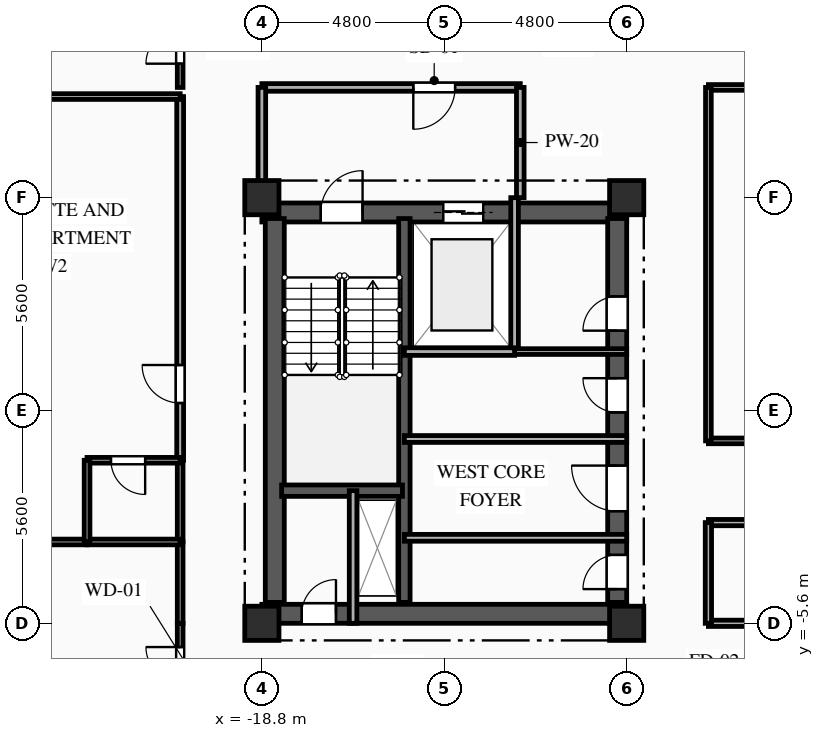
"""IFC4 building model, lengths in metres.
Left out: names, types, materials, properties, quantities, classifications, styles, units other than length and angle.
Written with IfcOpenShell. Run it as: python <this file> out.ifc"""

import sys

from ifc_helpers import new_model, si_unit, direction, frame, frame_2d, origin, origin_2d, place, context, subcontext, project, spatial, rectangle, extrude, element, fill, save


model = new_model("IFC4")
c1 = context("Model", 3, precision=1e-05, world=origin(), true_north=direction((0.0, 1.0)))
c2 = subcontext(c1, "Body", "Model", "MODEL_VIEW")
j1 = project(units=[si_unit("LENGTHUNIT", "METRE"), si_unit("PLANEANGLEUNIT", "RADIAN")], contexts=[c1])
p1 = place(None, origin())
s1 = spatial("IfcSite", under=j1, at=p1, CompositionType="ELEMENT")
p2 = place(p1, origin())
s2 = spatial("IfcBuilding", under=s1, at=p2, CompositionType="ELEMENT")
p3 = place(p2, frame((0.0, 0.0, 161.15)))
s3 = spatial("IfcBuildingStorey", under=s2, at=p3, CompositionType="ELEMENT", Elevation=161.15)
for number, where, z_axis, x_axis in (
    (1, (-18.8, -5.6, 0.0), (0.0, 0.0, 1.0), (1.0, 0.0, 0.0)),
    (2, (-18.8, 5.6, 0.0), (0.0, 0.0, 1.0), (1.0, 0.0, 0.0)),
    (3, (-9.2, -5.6, 0.0), (0.0, 0.0, 1.0), (1.0, 0.0, 0.0)),
    (4, (-9.2, 5.6, 0.0), (0.0, 0.0, 1.0), (1.0, 0.0, 0.0)),
):
    element("IfcColumn", number, at=place(p3, frame(where, z_axis=z_axis, x_axis=x_axis)), inside=s3, PredefinedType="COLUMN", context=c2, shape_type="SweptSolid", body=[
        extrude(rectangle(XDim=0.9, YDim=0.9, at=origin_2d()), origin(), (0.0, 0.0, 1.0), 3.35),
    ])
p4 = place(p3, frame((-18.8, 5.21, 0.0), z_axis=(0.0, 0.0, 1.0), x_axis=(1.0, 0.0, 0.0)))
e5 = element("IfcWall", 5, at=p4, inside=s3, PredefinedType="SHEAR", context=c2, shape_type="SweptSolid", body=[
    extrude(rectangle(XDim=9.6, YDim=0.5, at=frame_2d((4.8, 0.0))), origin(), (0.0, 0.0, 1.0), 3.04),
])
p5 = place(p4, frame((1.55, 0.0, 0.0)))
e6 = element("IfcOpeningElement", 6, at=p5, cuts=e5, PredefinedType="OPENING", context=c2, shape_type="SweptSolid", body=[
    extrude(rectangle(XDim=1.1, YDim=2.15, at=frame_2d((0.55, 1.075))), frame((0.0, 0.26, 0.0), z_axis=(0.0, -1.0, 0.0), x_axis=(1.0, 0.0, 0.0)), (0.0, 0.0, 1.0), 0.52),
])
p6 = place(p4, frame((4.775, 0.0, 0.0)))
e7 = element("IfcOpeningElement", 7, at=p6, cuts=e5, PredefinedType="OPENING", context=c2, shape_type="SweptSolid", body=[
    extrude(rectangle(XDim=1.05, YDim=2.1, at=frame_2d((0.525, 1.05))), frame((0.0, 0.26, 0.0), z_axis=(0.0, -1.0, 0.0), x_axis=(1.0, 0.0, 0.0)), (0.0, 0.0, 1.0), 0.52),
])
p7 = place(p3, frame((-18.8, -5.35, 0.0), z_axis=(0.0, 0.0, 1.0), x_axis=(1.0, 0.0, 0.0)))
e8 = element("IfcWall", 8, at=p7, inside=s3, PredefinedType="SHEAR", context=c2, shape_type="SweptSolid", body=[
    extrude(rectangle(XDim=9.6, YDim=0.5, at=frame_2d((4.8, 0.0))), origin(), (0.0, 0.0, 1.0), 3.04),
])
p8 = place(p7, frame((1.05, 0.0, 0.0)))
e9 = element("IfcOpeningElement", 9, at=p8, cuts=e8, PredefinedType="OPENING", context=c2, shape_type="SweptSolid", body=[
    extrude(rectangle(XDim=0.9, YDim=2.1, at=frame_2d((0.45, 1.05))), frame((0.0, 0.26, 0.0), z_axis=(0.0, -1.0, 0.0), x_axis=(1.0, 0.0, 0.0)), (0.0, 0.0, 1.0), 0.52),
])
p9 = place(p3, frame((-18.46, -5.05, 0.0), z_axis=(0.0, 0.0, 1.0), x_axis=(0.0, 1.0, 0.0)))
e10 = element("IfcWall", 10, at=p9, inside=s3, PredefinedType="SHEAR", context=c2, shape_type="SweptSolid", body=[
    extrude(rectangle(XDim=10.1, YDim=0.5, at=frame_2d((5.05, 0.0))), origin(), (0.0, 0.0, 1.0), 3.04),
])
p10 = place(p3, frame((-9.45, -5.05, 0.0), z_axis=(0.0, 0.0, 1.0), x_axis=(0.0, 1.0, 0.0)))
e11 = element("IfcWall", 11, at=p10, inside=s3, PredefinedType="SHEAR", context=c2, shape_type="SweptSolid", body=[
    extrude(rectangle(XDim=10.1, YDim=0.5, at=frame_2d((5.05, 0.0))), origin(), (0.0, 0.0, 1.0), 3.04),
])
p11 = place(p10, frame((7.15, 0.0, 0.0)))
e12 = element("IfcOpeningElement", 12, at=p11, cuts=e11, PredefinedType="OPENING", context=c2, shape_type="SweptSolid", body=[
    extrude(rectangle(XDim=0.9, YDim=2.1, at=frame_2d((0.45, 1.05))), frame((0.0, 0.26, 0.0), z_axis=(0.0, -1.0, 0.0), x_axis=(1.0, 0.0, 0.0)), (0.0, 0.0, 1.0), 0.52),
])
p12 = place(p10, frame((2.4, 0.0, 0.0)))
e13 = element("IfcOpeningElement", 13, at=p12, cuts=e11, PredefinedType="OPENING", context=c2, shape_type="SweptSolid", body=[
    extrude(rectangle(XDim=1.2, YDim=2.15, at=frame_2d((0.6, 1.075))), frame((0.0, 0.26, 0.0), z_axis=(0.0, -1.0, 0.0), x_axis=(1.0, 0.0, 0.0)), (0.0, 0.0, 1.0), 0.52),
])
p13 = place(p10, frame((0.35, 0.0, 0.0)))
e14 = element("IfcOpeningElement", 14, at=p13, cuts=e11, PredefinedType="OPENING", context=c2, shape_type="SweptSolid", body=[
    extrude(rectangle(XDim=0.9, YDim=2.1, at=frame_2d((0.45, 1.05))), frame((0.0, 0.26, 0.0), z_axis=(0.0, -1.0, 0.0), x_axis=(1.0, 0.0, 0.0)), (0.0, 0.0, 1.0), 0.52),
])
p14 = place(p10, frame((5.0, 0.0, 0.0)))
e15 = element("IfcOpeningElement", 15, at=p14, cuts=e11, PredefinedType="OPENING", context=c2, shape_type="SweptSolid", body=[
    extrude(rectangle(XDim=0.9, YDim=2.1, at=frame_2d((0.45, 1.05))), frame((0.0, 0.26, 0.0), z_axis=(0.0, -1.0, 0.0), x_axis=(1.0, 0.0, 0.0)), (0.0, 0.0, 1.0), 0.52),
])
p15 = place(p3, frame((-15.05, -5.05, 0.0), z_axis=(0.0, 0.0, 1.0), x_axis=(0.0, 1.0, 0.0)))
e16 = element("IfcWall", 16, at=p15, inside=s3, PredefinedType="SHEAR", context=c2, shape_type="SweptSolid", body=[
    extrude(rectangle(XDim=10.1, YDim=0.3, at=frame_2d((5.05, 0.0))), origin(), (0.0, 0.0, 1.0), 3.04),
])
p16 = place(p3, frame((-18.28, -2.11, 0.0), z_axis=(0.0, 0.0, 1.0), x_axis=(1.0, 0.0, 0.0)))
e17 = element("IfcWall", 17, at=p16, inside=s3, PredefinedType="SHEAR", context=c2, shape_type="SweptSolid", body=[
    extrude(rectangle(XDim=3.18, YDim=0.3, at=frame_2d((1.59, 0.0))), origin(), (0.0, 0.0, 1.0), 3.04),
])
p17 = place(p3, frame((-16.4, -5.6, 0.0), z_axis=(0.0, 0.0, 1.0), x_axis=(0.0, 1.0, 0.0)))
e18 = element("IfcWall", 18, at=p17, inside=s3, PredefinedType="PARTITIONING", context=c2, shape_type="SweptSolid", body=[
    extrude(rectangle(XDim=3.49, YDim=0.2, at=frame_2d((1.745, 0.0))), origin(), (0.0, 0.0, 1.0), 3.04),
])
p18 = place(p3, frame((-12.15, 1.55, 0.0), z_axis=(0.0, 0.0, 1.0), x_axis=(0.0, 1.0, 0.0)))
e19 = element("IfcWall", 19, at=p18, inside=s3, PredefinedType="PARTITIONING", context=c2, shape_type="SweptSolid", body=[
    extrude(rectangle(XDim=4.05, YDim=0.2, at=frame_2d((2.025, 0.0))), origin(), (0.0, 0.0, 1.0), 3.04),
])
p19 = place(p3, frame((-12.0, 8.5, 0.0), z_axis=(0.0, 0.0, 1.0), x_axis=(-1.0, 0.0, 0.0)))
e20 = element("IfcWall", 20, at=p19, inside=s3, PredefinedType="PARTITIONING", context=c2, shape_type="SweptSolid", body=[
    extrude(rectangle(XDim=6.8, YDim=0.2, at=frame_2d((3.4, 0.0))), origin(), (0.0, 0.0, 1.0), 3.04),
])
p20 = place(p19, frame((1.715, 0.0, 0.0)))
e21 = element("IfcOpeningElement", 21, at=p20, cuts=e20, PredefinedType="OPENING", context=c2, shape_type="SweptSolid", body=[
    extrude(rectangle(XDim=1.1, YDim=2.15, at=frame_2d((0.55, 1.075))), frame((0.0, 0.11, 0.0), z_axis=(0.0, -1.0, 0.0), x_axis=(1.0, 0.0, 0.0)), (0.0, 0.0, 1.0), 0.22),
])
p21 = place(p3, frame((-18.8, 8.5, 0.0), z_axis=(0.0, 0.0, 1.0), x_axis=(0.0, -1.0, 0.0)))
e22 = element("IfcWall", 22, at=p21, inside=s3, PredefinedType="PARTITIONING", context=c2, shape_type="SweptSolid", body=[
    extrude(rectangle(XDim=2.9, YDim=0.2, at=frame_2d((1.45, 0.0))), origin(), (0.0, 0.0, 1.0), 2.525),
])
p22 = place(p3, frame((-12.0, 5.6, 0.0), z_axis=(0.0, 0.0, 1.0), x_axis=(0.0, 1.0, 0.0)))
e23 = element("IfcWall", 23, at=p22, inside=s3, PredefinedType="PARTITIONING", context=c2, shape_type="SweptSolid", body=[
    extrude(rectangle(XDim=2.9, YDim=0.2, at=frame_2d((1.45, 0.0))), origin(), (0.0, 0.0, 1.0), 3.04),
])
p23 = place(p3, frame((-12.15, 1.55, 0.0), z_axis=(0.0, 0.0, 1.0), x_axis=(1.0, 0.0, 0.0)))
e24 = element("IfcWall", 24, at=p23, inside=s3, PredefinedType="PARTITIONING", context=c2, shape_type="SweptSolid", body=[
    extrude(rectangle(XDim=2.95, YDim=0.15, at=frame_2d((1.475, 0.0))), origin(), (0.0, 0.0, 1.0), 3.04),
])
p24 = place(p3, frame((-15.05, -3.35, 0.0), z_axis=(0.0, 0.0, 1.0), x_axis=(1.0, 0.0, 0.0)))
e25 = element("IfcWall", 25, at=p24, inside=s3, PredefinedType="PARTITIONING", context=c2, shape_type="SweptSolid", body=[
    extrude(rectangle(XDim=5.85, YDim=0.18, at=frame_2d((2.925, 0.0))), origin(), (0.0, 0.0, 1.0), 2.755),
])
p25 = place(p3, frame((-9.2, -0.75, 0.0), z_axis=(0.0, 0.0, 1.0), x_axis=(-1.0, 0.0, 0.0)))
e26 = element("IfcWall", 26, at=p25, inside=s3, PredefinedType="PARTITIONING", context=c2, shape_type="SweptSolid", body=[
    extrude(rectangle(XDim=5.85, YDim=0.18, at=frame_2d((2.925, 0.0))), origin(), (0.0, 0.0, 1.0), 3.04),
])
p26 = place(p3, frame((-20.95, 8.5, 0.0), z_axis=(0.0, 0.0, 1.0), x_axis=(0.0, 1.0, 0.0)))
e27 = element("IfcWall", 27, at=p26, inside=s3, PredefinedType="PARTITIONING", context=c2, shape_type="SweptSolid", body=[
    extrude(rectangle(XDim=2.15, YDim=0.15, at=frame_2d((1.075, 0.0))), origin(), (0.0, 0.0, 1.0), 3.04),
])
p27 = place(p26, frame((0.625, 0.0, 0.0)))
e28 = element("IfcOpeningElement", 28, at=p27, cuts=e27, PredefinedType="OPENING", context=c2, shape_type="SweptSolid", body=[
    extrude(rectangle(XDim=0.9, YDim=2.1, at=frame_2d((0.45, 1.05))), frame((0.0, 0.085, 0.0), z_axis=(0.0, -1.0, 0.0), x_axis=(1.0, 0.0, 0.0)), (0.0, 0.0, 1.0), 0.17),
])
p28 = place(p3, frame((0.0, 8.5, 0.0), z_axis=(0.0, 0.0, 1.0), x_axis=(-1.0, 0.0, 0.0)))
e29 = element("IfcWall", 29, at=p28, inside=s3, PredefinedType="PARTITIONING", context=c2, shape_type="SweptSolid", body=[
    extrude(rectangle(XDim=7.05, YDim=0.15, at=frame_2d((3.525, 0.0))), origin(), (0.0, 0.0, 1.0), 3.04),
])
p29 = place(p3, frame((-20.95, -7.75, 0.0), z_axis=(0.0, 0.0, 1.0), x_axis=(0.0, 1.0, 0.0)))
e30 = element("IfcWall", 30, at=p29, inside=s3, PredefinedType="PARTITIONING", context=c2, shape_type="SweptSolid", body=[
    extrude(rectangle(XDim=2.15, YDim=0.15, at=frame_2d((1.075, 0.0))), origin(), (0.0, 0.0, 1.0), 3.04),
])
p30 = place(p29, frame((0.625, 0.0, 0.0)))
e31 = element("IfcOpeningElement", 31, at=p30, cuts=e30, PredefinedType="OPENING", context=c2, shape_type="SweptSolid", body=[
    extrude(rectangle(XDim=0.9, YDim=2.1, at=frame_2d((0.45, 1.05))), frame((0.0, 0.085, 0.0), z_axis=(0.0, -1.0, 0.0), x_axis=(1.0, 0.0, 0.0)), (0.0, 0.0, 1.0), 0.17),
])
p31 = place(p3, frame((-7.05, -5.6, 0.0), z_axis=(0.0, 0.0, 1.0), x_axis=(1.0, 0.0, 0.0)))
e32 = element("IfcWall", 32, at=p31, inside=s3, PredefinedType="PARTITIONING", context=c2, shape_type="SweptSolid", body=[
    extrude(rectangle(XDim=7.05, YDim=0.165, at=frame_2d((3.525, 0.0))), origin(), (0.0, 0.0, 1.0), 2.525),
])
p32 = place(p3, frame((-20.95, -5.6, 0.0), z_axis=(0.0, 0.0, 1.0), x_axis=(0.0, 1.0, 0.0)))
e33 = element("IfcWall", 33, at=p32, inside=s3, PredefinedType="PARTITIONING", context=c2, shape_type="SweptSolid", body=[
    extrude(rectangle(XDim=2.14, YDim=0.15, at=frame_2d((1.07, 0.0))), origin(), (0.0, 0.0, 1.0), 3.04),
])
p33 = place(p3, frame((-20.95, -1.31, 0.0), z_axis=(0.0, 0.0, 1.0), x_axis=(0.0, 1.0, 0.0)))
e34 = element("IfcWall", 34, at=p33, inside=s3, PredefinedType="PARTITIONING", context=c2, shape_type="SweptSolid", body=[
    extrude(rectangle(XDim=9.57, YDim=0.18, at=frame_2d((4.785, 0.0))), origin(), (0.0, 0.0, 1.0), 3.04),
])
p34 = place(p33, frame((1.506, 0.0, 0.0)))
e35 = element("IfcOpeningElement", 35, at=p34, cuts=e34, PredefinedType="OPENING", context=c2, shape_type="SweptSolid", body=[
    extrude(rectangle(XDim=1.0, YDim=2.15, at=frame_2d((0.5, 1.075))), frame((0.0, 0.1, 0.0), z_axis=(0.0, -1.0, 0.0), x_axis=(1.0, 0.0, 0.0)), (0.0, 0.0, 1.0), 0.2),
])
p35 = place(p3, frame((-20.95, -3.46, 0.0), z_axis=(0.0, 0.0, 1.0), x_axis=(0.0, 1.0, 0.0)))
e36 = element("IfcWall", 36, at=p35, inside=s3, PredefinedType="PLUMBINGWALL", context=c2, shape_type="SweptSolid", body=[
    extrude(rectangle(XDim=2.15, YDim=0.15, at=frame_2d((1.075, 0.0))), origin(), (0.0, 0.0, 1.0), 3.04),
])
p36 = place(p3, frame((-7.05, -0.8, 0.0), z_axis=(0.0, 0.0, 1.0), x_axis=(1.0, 0.0, 0.0)))
e37 = element("IfcWall", 37, at=p36, inside=s3, PredefinedType="PARTITIONING", context=c2, shape_type="SweptSolid", body=[
    extrude(rectangle(XDim=14.1, YDim=0.15, at=frame_2d((7.05, 0.0))), origin(), (0.0, 0.0, 1.0), 3.04),
])
p37 = place(p36, frame((6.525, 0.0, 0.0)))
e38 = element("IfcOpeningElement", 38, at=p37, cuts=e37, PredefinedType="OPENING", context=c2, shape_type="SweptSolid", body=[
    extrude(rectangle(XDim=1.05, YDim=2.15, at=frame_2d((0.525, 1.075))), frame((0.0, 0.085, 0.0), z_axis=(0.0, -1.0, 0.0), x_axis=(1.0, 0.0, 0.0)), (0.0, 0.0, 1.0), 0.17),
])
p38 = place(p3, frame((7.05, -2.95, 0.0), z_axis=(0.0, 0.0, 1.0), x_axis=(-1.0, 0.0, 0.0)))
e39 = element("IfcWall", 39, at=p38, inside=s3, PredefinedType="PARTITIONING", context=c2, shape_type="SweptSolid", body=[
    extrude(rectangle(XDim=14.1, YDim=0.165, at=frame_2d((7.05, 0.0))), origin(), (0.0, 0.0, 1.0), 3.04),
])
p39 = place(p38, frame((6.475, 0.0, 0.0)))
e40 = element("IfcOpeningElement", 40, at=p39, cuts=e39, PredefinedType="OPENING", context=c2, shape_type="SweptSolid", body=[
    extrude(rectangle(XDim=1.15, YDim=2.15, at=frame_2d((0.575, 1.075))), frame((0.0, 0.093, 0.0), z_axis=(0.0, -1.0, 0.0), x_axis=(1.0, 0.0, 0.0)), (0.0, 0.0, 1.0), 0.185),
])
p40 = place(p3, frame((-7.05, 8.5, 0.0), z_axis=(0.0, 0.0, 1.0), x_axis=(0.0, -1.0, 0.0)))
e41 = element("IfcWall", 41, at=p40, inside=s3, PredefinedType="PARTITIONING", context=c2, shape_type="SweptSolid", body=[
    extrude(rectangle(XDim=9.3, YDim=0.15, at=frame_2d((4.65, 0.0))), origin(), (0.0, 0.0, 1.0), 3.04),
])
p41 = place(p3, frame((-7.05, -2.95, 0.0), z_axis=(0.0, 0.0, 1.0), x_axis=(0.0, -1.0, 0.0)))
e42 = element("IfcWall", 42, at=p41, inside=s3, PredefinedType="PARTITIONING", context=c2, shape_type="SweptSolid", body=[
    extrude(rectangle(XDim=2.65, YDim=0.165, at=frame_2d((1.325, 0.0))), origin(), (0.0, 0.0, 1.0), 3.04),
])
p42 = place(p3, frame((-24.765, -3.46, 0.0), z_axis=(0.0, 0.0, 1.0), x_axis=(1.0, 0.0, 0.0)))
e43 = element("IfcWall", 43, at=p42, inside=s3, PredefinedType="PARTITIONING", context=c2, shape_type="SweptSolid", body=[
    extrude(rectangle(XDim=1.365, YDim=0.15, at=frame_2d((0.683, 0.0))), origin(), (0.0, 0.0, 1.0), 3.04),
])
p43 = place(p3, frame((-23.4, -3.46, 0.0), z_axis=(0.0, 0.0, 1.0), x_axis=(1.0, 0.0, 0.0)))
e44 = element("IfcWall", 44, at=p43, inside=s3, PredefinedType="PLUMBINGWALL", context=c2, shape_type="SweptSolid", body=[
    extrude(rectangle(XDim=2.45, YDim=0.15, at=frame_2d((1.225, 0.0))), origin(), (0.0, 0.0, 1.0), 3.04),
])
p44 = place(p3, frame((-20.95, -1.31, 0.0), z_axis=(0.0, 0.0, 1.0), x_axis=(-1.0, 0.0, 0.0)))
e45 = element("IfcWall", 45, at=p44, inside=s3, PredefinedType="PLUMBINGWALL", context=c2, shape_type="SweptSolid", body=[
    extrude(rectangle(XDim=2.45, YDim=0.15, at=frame_2d((1.225, 0.0))), origin(), (0.0, 0.0, 1.0), 3.04),
])
p45 = place(p44, frame((0.921, 0.0, 0.0)))
e46 = element("IfcOpeningElement", 46, at=p45, cuts=e45, PredefinedType="OPENING", context=c2, shape_type="SweptSolid", body=[
    extrude(rectangle(XDim=0.9, YDim=2.1, at=frame_2d((0.45, 1.05))), frame((0.0, 0.085, 0.0), z_axis=(0.0, -1.0, 0.0), x_axis=(1.0, 0.0, 0.0)), (0.0, 0.0, 1.0), 0.17),
])
p46 = place(p3, frame((-23.4, -1.31, 0.0), z_axis=(0.0, 0.0, 1.0), x_axis=(0.0, -1.0, 0.0)))
e47 = element("IfcWall", 47, at=p46, inside=s3, PredefinedType="PLUMBINGWALL", context=c2, shape_type="SweptSolid", body=[
    extrude(rectangle(XDim=2.15, YDim=0.15, at=frame_2d((1.075, 0.0))), origin(), (0.0, 0.0, 1.0), 3.04),
])
p47 = place(p3, frame((-24.765, 8.26, 0.0), z_axis=(0.0, 0.0, 1.0), x_axis=(1.0, 0.0, 0.0)))
e48 = element("IfcWall", 48, at=p47, inside=s3, PredefinedType="PARTITIONING", context=c2, shape_type="SweptSolid", body=[
    extrude(rectangle(XDim=3.815, YDim=0.15, at=frame_2d((1.907, 0.0))), origin(), (0.0, 0.0, 1.0), 3.04),
])
p48 = place(p3, frame((-15.05, 1.55, 0.0), z_axis=(0.0, 0.0, 1.0), x_axis=(1.0, 0.0, 0.0)))
e49 = element("IfcWall", 49, at=p48, inside=s3, PredefinedType="PARTITIONING", context=c2, shape_type="SweptSolid", body=[
    extrude(rectangle(XDim=2.9, YDim=0.2, at=frame_2d((1.45, 0.0))), origin(), (0.0, 0.0, 1.0), 3.04),
])
p49 = place(p5, origin())
e50 = element("IfcDoor", 50, at=p49, inside=s3, OperationType="SINGLE_SWING_RIGHT", PredefinedType="DOOR", context=c2, shape_type="SweptSolid", body=[
    extrude(rectangle(XDim=1.1, YDim=2.15, at=frame_2d((0.55, 1.075))), frame((0.0, 0.025, 0.0), z_axis=(0.0, -1.0, 0.0), x_axis=(1.0, 0.0, 0.0)), (0.0, 0.0, 1.0), 0.05),
])
fill(e6, e50)
p50 = place(p6, origin())
e51 = element("IfcDoor", 51, at=p50, inside=s3, OperationType="DOUBLE_DOOR_SLIDING", PredefinedType="DOOR", context=c2, shape_type="SweptSolid", body=[
    extrude(rectangle(XDim=1.05, YDim=2.1, at=frame_2d((0.525, 1.05))), frame((0.0, 0.025, 0.0), z_axis=(0.0, -1.0, 0.0), x_axis=(1.0, 0.0, 0.0)), (0.0, 0.0, 1.0), 0.05),
])
fill(e7, e51)
p51 = place(p8, origin())
e52 = element("IfcDoor", 52, at=p51, inside=s3, OperationType="SINGLE_SWING_RIGHT", PredefinedType="DOOR", context=c2, shape_type="SweptSolid", body=[
    extrude(rectangle(XDim=0.9, YDim=2.1, at=frame_2d((0.45, 1.05))), frame((0.0, 0.025, 0.0), z_axis=(0.0, -1.0, 0.0), x_axis=(1.0, 0.0, 0.0)), (0.0, 0.0, 1.0), 0.05),
])
fill(e9, e52)
p52 = place(p20, origin())
e53 = element("IfcDoor", 53, at=p52, inside=s3, OperationType="SINGLE_SWING_RIGHT", PredefinedType="DOOR", context=c2, shape_type="SweptSolid", body=[
    extrude(rectangle(XDim=1.1, YDim=2.15, at=frame_2d((0.55, 1.075))), frame((0.0, 0.025, 0.0), z_axis=(0.0, -1.0, 0.0), x_axis=(1.0, 0.0, 0.0)), (0.0, 0.0, 1.0), 0.05),
])
fill(e21, e53)
p53 = place(p11, origin())
e54 = element("IfcDoor", 54, at=p53, inside=s3, OperationType="SINGLE_SWING_LEFT", PredefinedType="DOOR", context=c2, shape_type="SweptSolid", body=[
    extrude(rectangle(XDim=0.9, YDim=2.1, at=frame_2d((0.45, 1.05))), frame((0.0, 0.025, 0.0), z_axis=(0.0, -1.0, 0.0), x_axis=(1.0, 0.0, 0.0)), (0.0, 0.0, 1.0), 0.05),
])
fill(e12, e54)
p54 = place(p12, origin())
e55 = element("IfcDoor", 55, at=p54, inside=s3, OperationType="SINGLE_SWING_RIGHT", PredefinedType="DOOR", context=c2, shape_type="SweptSolid", body=[
    extrude(rectangle(XDim=1.2, YDim=2.15, at=frame_2d((0.6, 1.075))), frame((0.0, 0.025, 0.0), z_axis=(0.0, -1.0, 0.0), x_axis=(1.0, 0.0, 0.0)), (0.0, 0.0, 1.0), 0.05),
])
fill(e13, e55)
p55 = place(p13, origin())
e56 = element("IfcDoor", 56, at=p55, inside=s3, OperationType="SINGLE_SWING_LEFT", PredefinedType="DOOR", context=c2, shape_type="SweptSolid", body=[
    extrude(rectangle(XDim=0.9, YDim=2.1, at=frame_2d((0.45, 1.05))), frame((0.0, 0.025, 0.0), z_axis=(0.0, -1.0, 0.0), x_axis=(1.0, 0.0, 0.0)), (0.0, 0.0, 1.0), 0.05),
])
fill(e14, e56)
p56 = place(p14, origin())
e57 = element("IfcDoor", 57, at=p56, inside=s3, OperationType="SINGLE_SWING_RIGHT", PredefinedType="DOOR", context=c2, shape_type="SweptSolid", body=[
    extrude(rectangle(XDim=0.9, YDim=2.1, at=frame_2d((0.45, 1.05))), frame((0.0, 0.025, 0.0), z_axis=(0.0, -1.0, 0.0), x_axis=(1.0, 0.0, 0.0)), (0.0, 0.0, 1.0), 0.05),
])
fill(e15, e57)
p57 = place(p27, origin())
e58 = element("IfcDoor", 58, at=p57, inside=s3, OperationType="SINGLE_SWING_LEFT", PredefinedType="DOOR", context=c2, shape_type="SweptSolid", body=[
    extrude(rectangle(XDim=0.9, YDim=2.1, at=frame_2d((0.45, 1.05))), frame((0.0, 0.025, 0.0), z_axis=(0.0, -1.0, 0.0), x_axis=(1.0, 0.0, 0.0)), (0.0, 0.0, 1.0), 0.05),
])
fill(e28, e58)
p58 = place(p30, origin())
e59 = element("IfcDoor", 59, at=p58, inside=s3, OperationType="SINGLE_SWING_RIGHT", PredefinedType="DOOR", context=c2, shape_type="SweptSolid", body=[
    extrude(rectangle(XDim=0.9, YDim=2.1, at=frame_2d((0.45, 1.05))), frame((0.0, 0.025, 0.0), z_axis=(0.0, -1.0, 0.0), x_axis=(1.0, 0.0, 0.0)), (0.0, 0.0, 1.0), 0.05),
])
fill(e31, e59)
p59 = place(p34, origin())
e60 = element("IfcDoor", 60, at=p59, inside=s3, OperationType="SINGLE_SWING_RIGHT", PredefinedType="DOOR", context=c2, shape_type="SweptSolid", body=[
    extrude(rectangle(XDim=1.0, YDim=2.15, at=frame_2d((0.5, 1.075))), frame((0.0, 0.025, 0.0), z_axis=(0.0, -1.0, 0.0), x_axis=(1.0, 0.0, 0.0)), (0.0, 0.0, 1.0), 0.05),
])
fill(e35, e60)
p60 = place(p45, origin())
e61 = element("IfcDoor", 61, at=p60, inside=s3, OperationType="SINGLE_SWING_LEFT", PredefinedType="DOOR", context=c2, shape_type="SweptSolid", body=[
    extrude(rectangle(XDim=0.9, YDim=2.1, at=frame_2d((0.45, 1.05))), frame((0.0, 0.025, 0.0), z_axis=(0.0, -1.0, 0.0), x_axis=(1.0, 0.0, 0.0)), (0.0, 0.0, 1.0), 0.05),
])
fill(e46, e61)
save(model, sys.argv[1])
